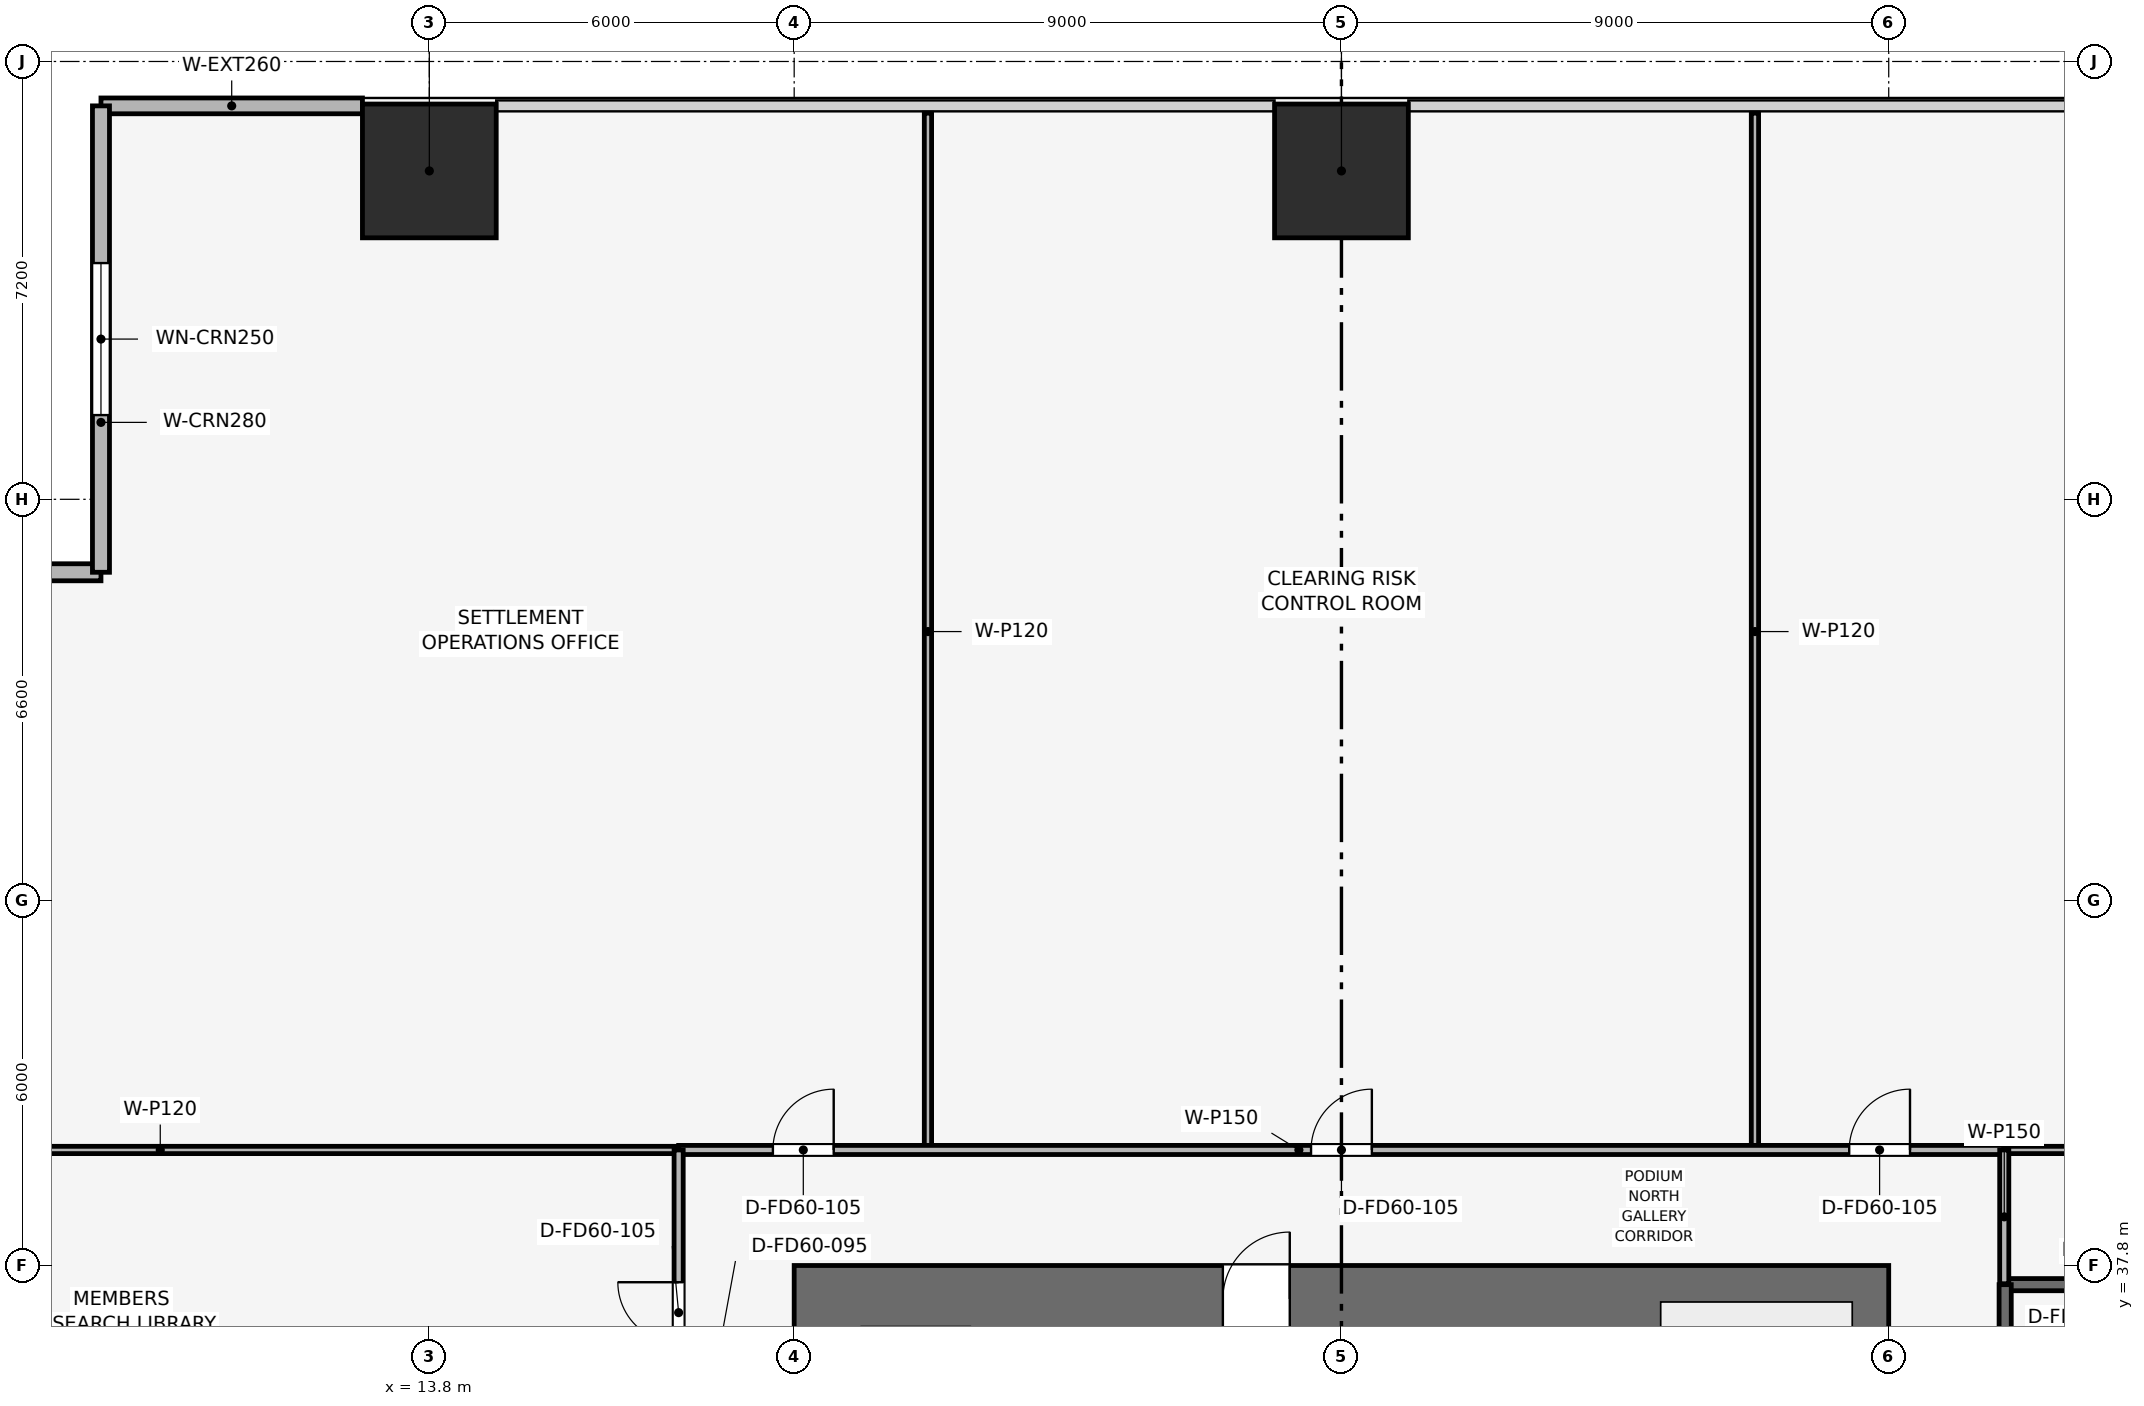
"""IFC4 building model, lengths in metres.
Left out: names, types, materials, properties, quantities, classifications, styles, units other than length and angle.
Written with IfcOpenShell. Run it as: python <this file> out.ifc"""

import sys

from ifc_helpers import new_model, si_unit, direction, frame, frame_2d, origin, origin_2d, place, context, subcontext, project, spatial, rectangle, extrude, element, fill, save


model = new_model("IFC4")
c1 = context("Model", 3, precision=1e-05, world=origin(), true_north=direction((0.0, 1.0)))
c2 = subcontext(c1, "Body", "Model", "MODEL_VIEW")
j1 = project(units=[si_unit("LENGTHUNIT", "METRE"), si_unit("PLANEANGLEUNIT", "RADIAN")], contexts=[c1])
p1 = place(None, origin())
s1 = spatial("IfcSite", under=j1, at=p1, CompositionType="ELEMENT")
p2 = place(p1, origin())
s2 = spatial("IfcBuilding", under=s1, at=p2, CompositionType="ELEMENT")
p3 = place(p2, frame((0.0, 0.0, 8.4)))
s3 = spatial("IfcBuildingStorey", under=s2, at=p3, CompositionType="ELEMENT", Elevation=8.4)
p4 = place(p3, frame((19.8, 37.25, 0.0), z_axis=(0.0, 0.0, 1.0), x_axis=(1.0, 0.0, 0.0)))
e1 = element("IfcWall", 1, at=p4, inside=s3, PredefinedType="SHEAR", context=c2, shape_type="SweptSolid", body=[
    extrude(rectangle(XDim=18.0, YDim=1.1, at=frame_2d((9.0, 0.0))), origin(), (0.0, 0.0, 1.0), 5.4),
])
p5 = place(p4, frame((7.05, 0.0, 0.0)))
e2 = element("IfcOpeningElement", 2, at=p5, cuts=e1, PredefinedType="OPENING", context=c2, shape_type="SweptSolid", body=[
    extrude(rectangle(XDim=1.1, YDim=2.15, at=frame_2d((0.55, 1.075))), frame((0.0, 0.56, 0.0), z_axis=(0.0, -1.0, 0.0), x_axis=(1.0, 0.0, 0.0)), (0.0, 0.0, 1.0), 1.12),
])
for number, where, z_axis, x_axis in (
    (3, (28.8, 55.8, 0.002), (0.0, 0.0, 1.0), (1.0, 0.0, 0.0)),
    (4, (13.8, 55.8, 0.002), (0.0, 0.0, 1.0), (1.0, 0.0, 0.0)),
):
    element("IfcColumn", number, at=place(p3, frame(where, z_axis=z_axis, x_axis=x_axis)), inside=s3, PredefinedType="PILASTER", context=c2, shape_type="SweptSolid", body=[
        extrude(rectangle(XDim=2.2, YDim=2.2, at=origin_2d()), origin(), (0.0, 0.0, 1.0), 5.396),
    ])
p6 = place(p3, frame((8.4, 56.87, 0.0), z_axis=(0.0, 0.0, 1.0), x_axis=(1.0, 0.0, 0.0)))
e5 = element("IfcWall", 5, at=p6, inside=s3, PredefinedType="SOLIDWALL", context=c2, shape_type="SweptSolid", body=[
    extrude(rectangle(XDim=4.3, YDim=0.26, at=frame_2d((2.15, 0.0))), origin(), (0.0, 0.0, 1.0), 5.05),
])
p7 = place(p3, frame((0.73, 49.2, 0.0), z_axis=(0.0, 0.0, 1.0), x_axis=(1.0, 0.0, 0.0)))
e6 = element("IfcWall", 6, at=p7, inside=s3, PredefinedType="SOLIDWALL", context=c2, shape_type="SweptSolid", body=[
    extrude(rectangle(XDim=7.67, YDim=0.28, at=frame_2d((3.835, 0.0))), origin(), (0.0, 0.0, 1.0), 5.05),
])
p8 = place(p7, frame((2.585, 0.0, 0.9)))
e7 = element("IfcOpeningElement", 7, at=p8, cuts=e6, PredefinedType="OPENING", context=c2, shape_type="SweptSolid", body=[
    extrude(rectangle(XDim=2.5, YDim=1.9, at=frame_2d((1.25, 0.95))), frame((0.0, 0.15, 0.0), z_axis=(0.0, -1.0, 0.0), x_axis=(1.0, 0.0, 0.0)), (0.0, 0.0, 1.0), 0.3),
])
p9 = place(p3, frame((8.4, 49.2, 0.0), z_axis=(0.0, 0.0, 1.0), x_axis=(0.0, 1.0, 0.0)))
e8 = element("IfcWall", 8, at=p9, inside=s3, PredefinedType="SOLIDWALL", context=c2, shape_type="SweptSolid", body=[
    extrude(rectangle(XDim=7.67, YDim=0.28, at=frame_2d((3.835, 0.0))), origin(), (0.0, 0.0, 1.0), 5.05),
])
p10 = place(p9, frame((2.585, 0.0, 0.9)))
e9 = element("IfcOpeningElement", 9, at=p10, cuts=e8, PredefinedType="OPENING", context=c2, shape_type="SweptSolid", body=[
    extrude(rectangle(XDim=2.5, YDim=1.9, at=frame_2d((1.25, 0.95))), frame((0.0, 0.15, 0.0), z_axis=(0.0, -1.0, 0.0), x_axis=(1.0, 0.0, 0.0)), (0.0, 0.0, 1.0), 0.3),
])
p11 = place(p3, frame((39.715, 37.485, 0.0), z_axis=(0.0, 0.0, 1.0), x_axis=(1.0, 0.0, 0.0)))
e10 = element("IfcWall", 10, at=p11, inside=s3, PredefinedType="SHEAR", context=c2, shape_type="SweptSolid", body=[
    extrude(rectangle(XDim=8.57, YDim=0.2, at=frame_2d((4.285, 0.0))), origin(), (0.0, 0.0, 1.0), 5.398),
])
p12 = place(p3, frame((39.715, 34.165, 0.0), z_axis=(0.0, 0.0, 1.0), x_axis=(0.0, 1.0, 0.0)))
e11 = element("IfcWall", 11, at=p12, inside=s3, PredefinedType="SHEAR", context=c2, shape_type="SweptSolid", body=[
    extrude(rectangle(XDim=3.32, YDim=0.2, at=frame_2d((1.66, 0.0))), origin(), (0.0, 0.0, 1.0), 5.398),
])
p13 = place(p12, frame((0.9, 0.0, 0.0)))
e12 = element("IfcOpeningElement", 12, at=p13, cuts=e11, PredefinedType="OPENING", context=c2, shape_type="SweptSolid", body=[
    extrude(rectangle(XDim=1.1, YDim=2.15, at=frame_2d((0.55, 1.075))), frame((0.0, 0.11, 0.0), z_axis=(0.0, -1.0, 0.0), x_axis=(1.0, 0.0, 0.0)), (0.0, 0.0, 1.0), 0.22),
])
for number, where, z_axis, x_axis in (
    (13, (22.0, 39.7, 0.0), (0.0, 0.0, 1.0), (0.0, 1.0, 0.0)),
    (14, (35.6, 39.7, 0.0), (0.0, 0.0, 1.0), (0.0, 1.0, 0.0)),
):
    element("IfcWall", number, at=place(p3, frame(where, z_axis=z_axis, x_axis=x_axis)), inside=s3, PredefinedType="PARTITIONING", context=c2, shape_type="SweptSolid", body=[
        extrude(rectangle(XDim=17.05, YDim=0.12, at=frame_2d((8.525, 0.0))), origin(), (0.0, 0.0, 1.0), 4.035),
    ])
p14 = place(p3, frame((0.85, 39.7, 0.0), z_axis=(0.0, 0.0, 1.0), x_axis=(1.0, 0.0, 0.0)))
e15 = element("IfcWall", 15, at=p14, inside=s3, PredefinedType="PARTITIONING", context=c2, shape_type="SweptSolid", body=[
    extrude(rectangle(XDim=17.05, YDim=0.12, at=frame_2d((8.525, 0.0))), origin(), (0.0, 0.0, 1.0), 4.035),
])
p15 = place(p3, frame((39.7, 39.7, 0.0), z_axis=(0.0, 0.0, 1.0), x_axis=(1.0, 0.0, 0.0)))
e16 = element("IfcWall", 16, at=p15, inside=s3, PredefinedType="PARTITIONING", context=c2, shape_type="SweptSolid", body=[
    extrude(rectangle(XDim=9.3, YDim=0.12, at=frame_2d((4.65, 0.0))), origin(), (0.0, 0.0, 1.0), 5.05),
])
p16 = place(p3, frame((17.9, 39.7, 0.0), z_axis=(0.0, 0.0, 1.0), x_axis=(1.0, 0.0, 0.0)))
e17 = element("IfcWall", 17, at=p16, inside=s3, PredefinedType="PARTITIONING", context=c2, shape_type="SweptSolid", body=[
    extrude(rectangle(XDim=21.8, YDim=0.15, at=frame_2d((10.9, 0.0))), origin(), (0.0, 0.0, 1.0), 4.135),
])
p17 = place(p16, frame((1.55, 0.0, 0.0)))
e18 = element("IfcOpeningElement", 18, at=p17, cuts=e17, PredefinedType="OPENING", context=c2, shape_type="SweptSolid", body=[
    extrude(rectangle(XDim=1.0, YDim=2.15, at=frame_2d((0.5, 1.075))), frame((0.0, 0.085, 0.0), z_axis=(0.0, -1.0, 0.0), x_axis=(1.0, 0.0, 0.0)), (0.0, 0.0, 1.0), 0.17),
])
p18 = place(p16, frame((10.4, 0.0, 0.0)))
e19 = element("IfcOpeningElement", 19, at=p18, cuts=e17, PredefinedType="OPENING", context=c2, shape_type="SweptSolid", body=[
    extrude(rectangle(XDim=1.0, YDim=2.15, at=frame_2d((0.5, 1.075))), frame((0.0, 0.085, 0.0), z_axis=(0.0, -1.0, 0.0), x_axis=(1.0, 0.0, 0.0)), (0.0, 0.0, 1.0), 0.17),
])
p19 = place(p16, frame((19.25, 0.0, 0.0)))
e20 = element("IfcOpeningElement", 20, at=p19, cuts=e17, PredefinedType="OPENING", context=c2, shape_type="SweptSolid", body=[
    extrude(rectangle(XDim=1.0, YDim=2.15, at=frame_2d((0.5, 1.075))), frame((0.0, 0.085, 0.0), z_axis=(0.0, -1.0, 0.0), x_axis=(1.0, 0.0, 0.0)), (0.0, 0.0, 1.0), 0.17),
])
p20 = place(p3, frame((17.9, 23.45, 0.0), z_axis=(0.0, 0.0, 1.0), x_axis=(0.0, 1.0, 0.0)))
e21 = element("IfcWall", 21, at=p20, inside=s3, PredefinedType="PARTITIONING", context=c2, shape_type="SweptSolid", body=[
    extrude(rectangle(XDim=16.25, YDim=0.15, at=frame_2d((8.125, 0.0))), origin(), (0.0, 0.0, 1.0), 4.135),
])
p21 = place(p20, frame((1.9, 0.0, 0.0)))
e22 = element("IfcOpeningElement", 22, at=p21, cuts=e21, PredefinedType="OPENING", context=c2, shape_type="SweptSolid", body=[
    extrude(rectangle(XDim=0.9, YDim=2.1, at=frame_2d((0.45, 1.05))), frame((0.0, 0.085, 0.0), z_axis=(0.0, -1.0, 0.0), x_axis=(1.0, 0.0, 0.0)), (0.0, 0.0, 1.0), 0.17),
])
p22 = place(p20, frame((5.6, 0.0, 0.0)))
e23 = element("IfcOpeningElement", 23, at=p22, cuts=e21, PredefinedType="OPENING", context=c2, shape_type="SweptSolid", body=[
    extrude(rectangle(XDim=0.9, YDim=2.1, at=frame_2d((0.45, 1.05))), frame((0.0, 0.085, 0.0), z_axis=(0.0, -1.0, 0.0), x_axis=(1.0, 0.0, 0.0)), (0.0, 0.0, 1.0), 0.17),
])
p23 = place(p20, frame((8.85, 0.0, 0.0)))
e24 = element("IfcOpeningElement", 24, at=p23, cuts=e21, PredefinedType="OPENING", context=c2, shape_type="SweptSolid", body=[
    extrude(rectangle(XDim=0.95, YDim=2.1, at=frame_2d((0.475, 1.05))), frame((0.0, 0.085, 0.0), z_axis=(0.0, -1.0, 0.0), x_axis=(1.0, 0.0, 0.0)), (0.0, 0.0, 1.0), 0.17),
])
p24 = place(p20, frame((13.075, 0.0, 0.0)))
e25 = element("IfcOpeningElement", 25, at=p24, cuts=e21, PredefinedType="OPENING", context=c2, shape_type="SweptSolid", body=[
    extrude(rectangle(XDim=1.0, YDim=2.15, at=frame_2d((0.5, 1.075))), frame((0.0, 0.085, 0.0), z_axis=(0.0, -1.0, 0.0), x_axis=(1.0, 0.0, 0.0)), (0.0, 0.0, 1.0), 0.17),
])
p25 = place(p3, frame((39.7, 37.5, 0.0), z_axis=(0.0, 0.0, 1.0), x_axis=(0.0, 1.0, 0.0)))
e26 = element("IfcWall", 26, at=p25, inside=s3, PredefinedType="PARTITIONING", context=c2, shape_type="SweptSolid", body=[
    extrude(rectangle(XDim=2.2, YDim=0.15, at=frame_2d((1.1, 0.0))), origin(), (0.0, 0.0, 1.0), 5.05),
])
p26 = place(p10, origin())
e27 = element("IfcWindow", 27, at=p26, inside=s3, PartitioningType="SINGLE_PANEL", PredefinedType="WINDOW", context=c2, shape_type="SweptSolid", body=[
    extrude(rectangle(XDim=2.5, YDim=1.9, at=frame_2d((1.25, 0.95))), frame((0.0, 0.03, 0.0), z_axis=(0.0, -1.0, 0.0), x_axis=(1.0, 0.0, 0.0)), (0.0, 0.0, 1.0), 0.06),
])
fill(e9, e27)
p27 = place(p17, origin())
e28 = element("IfcDoor", 28, at=p27, inside=s3, OperationType="SINGLE_SWING_RIGHT", PredefinedType="DOOR", context=c2, shape_type="SweptSolid", body=[
    extrude(rectangle(XDim=1.0, YDim=2.15, at=frame_2d((0.5, 1.075))), frame((0.0, 0.025, 0.0), z_axis=(0.0, -1.0, 0.0), x_axis=(1.0, 0.0, 0.0)), (0.0, 0.0, 1.0), 0.05),
])
fill(e18, e28)
p28 = place(p18, origin())
e29 = element("IfcDoor", 29, at=p28, inside=s3, OperationType="SINGLE_SWING_RIGHT", PredefinedType="DOOR", context=c2, shape_type="SweptSolid", body=[
    extrude(rectangle(XDim=1.0, YDim=2.15, at=frame_2d((0.5, 1.075))), frame((0.0, 0.025, 0.0), z_axis=(0.0, -1.0, 0.0), x_axis=(1.0, 0.0, 0.0)), (0.0, 0.0, 1.0), 0.05),
])
fill(e19, e29)
p29 = place(p19, origin())
e30 = element("IfcDoor", 30, at=p29, inside=s3, OperationType="SINGLE_SWING_RIGHT", PredefinedType="DOOR", context=c2, shape_type="SweptSolid", body=[
    extrude(rectangle(XDim=1.0, YDim=2.15, at=frame_2d((0.5, 1.075))), frame((0.0, 0.025, 0.0), z_axis=(0.0, -1.0, 0.0), x_axis=(1.0, 0.0, 0.0)), (0.0, 0.0, 1.0), 0.05),
])
fill(e20, e30)
p30 = place(p24, origin())
e31 = element("IfcDoor", 31, at=p30, inside=s3, OperationType="SINGLE_SWING_RIGHT", PredefinedType="DOOR", context=c2, shape_type="SweptSolid", body=[
    extrude(rectangle(XDim=1.0, YDim=2.15, at=frame_2d((0.5, 1.075))), frame((0.0, 0.025, 0.0), z_axis=(0.0, -1.0, 0.0), x_axis=(1.0, 0.0, 0.0)), (0.0, 0.0, 1.0), 0.05),
])
fill(e25, e31)
p31 = place(p5, origin())
e32 = element("IfcDoor", 32, at=p31, inside=s3, OperationType="SINGLE_SWING_RIGHT", PredefinedType="DOOR", context=c2, shape_type="SweptSolid", body=[
    extrude(rectangle(XDim=1.1, YDim=2.15, at=frame_2d((0.55, 1.075))), frame((0.0, 0.025, 0.0), z_axis=(0.0, -1.0, 0.0), x_axis=(1.0, 0.0, 0.0)), (0.0, 0.0, 1.0), 0.05),
])
fill(e2, e32)
save(model, sys.argv[1])
